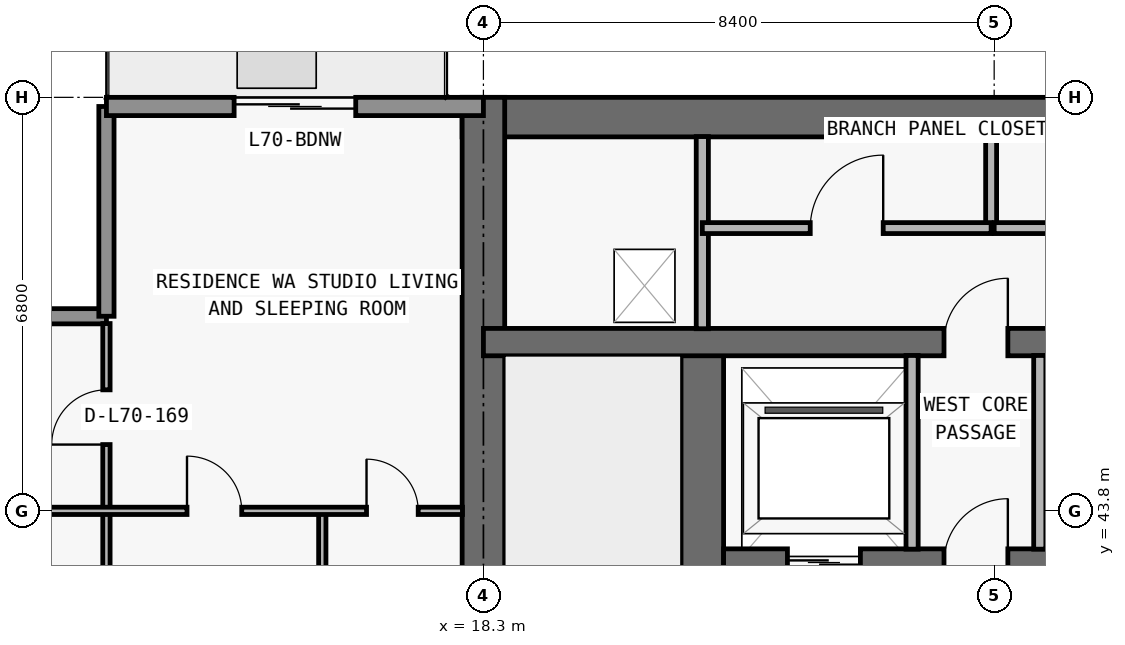
"""IFC4 building model, lengths in metres.
Left out: names, types, materials, properties, quantities, classifications, styles, units other than length and angle.
Written with IfcOpenShell. Run it as: python <this file> out.ifc"""

import sys

from ifc_helpers import new_model, si_unit, direction, frame, frame_2d, origin, place, context, subcontext, project, spatial, rectangle, extrude, element, fill, save


model = new_model("IFC4")
c1 = context("Model", 3, precision=1e-05, world=origin(), true_north=direction((0.0, 1.0)))
c2 = subcontext(c1, "Body", "Model", "MODEL_VIEW")
j1 = project(units=[si_unit("LENGTHUNIT", "METRE"), si_unit("PLANEANGLEUNIT", "RADIAN")], contexts=[c1])
p1 = place(None, origin())
s1 = spatial("IfcSite", under=j1, at=p1, CompositionType="ELEMENT")
p2 = place(p1, origin())
s2 = spatial("IfcBuilding", under=s1, at=p2, CompositionType="ELEMENT")
p3 = place(p2, frame((0.0, 0.0, 249.6)))
s3 = spatial("IfcBuildingStorey", under=s2, at=p3, CompositionType="ELEMENT", Elevation=249.6)
p4 = place(p3, frame((17.95, 50.275, 0.0), z_axis=(0.0, 0.0, 1.0), x_axis=(1.0, 0.0, 0.0)))
e1 = element("IfcWall", 1, at=p4, inside=s3, PredefinedType="SHEAR", context=c2, shape_type="SweptSolid", body=[
    extrude(rectangle(XDim=41.9, YDim=0.65, at=frame_2d((20.95, 0.0))), origin(), (0.0, 0.0, 1.0), 3.05),
])
p5 = place(p3, frame((18.3, 36.65, 0.0), z_axis=(0.0, 0.0, 1.0), x_axis=(0.0, 1.0, 0.0)))
e2 = element("IfcWall", 2, at=p5, inside=s3, PredefinedType="SHEAR", context=c2, shape_type="SweptSolid", body=[
    extrude(rectangle(XDim=13.95, YDim=0.7, at=frame_2d((6.975, 0.0))), origin(), (0.0, 0.0, 1.0), 3.05),
])
p6 = place(p3, frame((21.9, 37.0, 0.0), z_axis=(0.0, 0.0, 1.0), x_axis=(0.0, 1.0, 0.0)))
e3 = element("IfcWall", 3, at=p6, inside=s3, PredefinedType="SHEAR", context=c2, shape_type="SweptSolid", body=[
    extrude(rectangle(XDim=9.575, YDim=0.7, at=frame_2d((4.788, 0.0))), origin(), (0.0, 0.0, 1.0), 3.05),
])
p7 = place(p6, frame((0.55, 0.0, 0.0)))
e4 = element("IfcOpeningElement", 4, at=p7, cuts=e3, PredefinedType="OPENING", context=c2, shape_type="SweptSolid", body=[
    extrude(rectangle(XDim=1.1, YDim=2.15, at=frame_2d((0.55, 1.075))), frame((0.0, 0.36, 0.0), z_axis=(0.0, -1.0, 0.0), x_axis=(1.0, 0.0, 0.0)), (0.0, 0.0, 1.0), 0.72),
])
p8 = place(p3, frame((22.25, 42.95, 0.0), z_axis=(0.0, 0.0, 1.0), x_axis=(1.0, 0.0, 0.0)))
e5 = element("IfcWall", 5, at=p8, inside=s3, PredefinedType="SHEAR", context=c2, shape_type="SweptSolid", body=[
    extrude(rectangle(XDim=33.3, YDim=0.45, at=frame_2d((16.65, 0.0))), origin(), (0.0, 0.0, 1.0), 3.05),
])
p9 = place(p8, frame((1.05, 0.0, 0.0)))
e6 = element("IfcOpeningElement", 6, at=p9, cuts=e5, PredefinedType="OPENING", context=c2, shape_type="SweptSolid", body=[
    extrude(rectangle(XDim=1.2, YDim=2.2, at=frame_2d((0.6, 1.1))), frame((0.0, 0.235, 0.0), z_axis=(0.0, -1.0, 0.0), x_axis=(1.0, 0.0, 0.0)), (0.0, 0.0, 1.0), 0.47),
])
p10 = place(p8, frame((31.05, 0.0, 0.0)))
e7 = element("IfcOpeningElement", 7, at=p10, cuts=e5, PredefinedType="OPENING", context=c2, shape_type="SweptSolid", body=[
    extrude(rectangle(XDim=1.2, YDim=2.2, at=frame_2d((0.6, 1.1))), frame((0.0, 0.235, 0.0), z_axis=(0.0, -1.0, 0.0), x_axis=(1.0, 0.0, 0.0)), (0.0, 0.0, 1.0), 0.47),
])
p11 = place(p8, frame((26.45, 0.0, 0.0)))
e8 = element("IfcOpeningElement", 8, at=p11, cuts=e5, PredefinedType="OPENING", context=c2, shape_type="SweptSolid", body=[
    extrude(rectangle(XDim=1.1, YDim=2.2, at=frame_2d((0.55, 1.1))), frame((0.0, 0.235, 0.0), z_axis=(0.0, -1.0, 0.0), x_axis=(1.0, 0.0, 0.0)), (0.0, 0.0, 1.0), 0.47),
])
p12 = place(p8, frame((5.95, 0.0, 0.0)))
e9 = element("IfcOpeningElement", 9, at=p12, cuts=e5, PredefinedType="OPENING", context=c2, shape_type="SweptSolid", body=[
    extrude(rectangle(XDim=1.1, YDim=2.2, at=frame_2d((0.55, 1.1))), frame((0.0, 0.235, 0.0), z_axis=(0.0, -1.0, 0.0), x_axis=(1.0, 0.0, 0.0)), (0.0, 0.0, 1.0), 0.47),
])
p13 = place(p8, frame((3.625, 0.0, 0.0)))
e10 = element("IfcOpeningElement", 10, at=p13, cuts=e5, PredefinedType="OPENING", context=c2, shape_type="SweptSolid", body=[
    extrude(rectangle(XDim=1.05, YDim=2.15, at=frame_2d((0.525, 1.075))), frame((0.0, 0.235, 0.0), z_axis=(0.0, -1.0, 0.0), x_axis=(1.0, 0.0, 0.0)), (0.0, 0.0, 1.0), 0.47),
])
p14 = place(p8, frame((28.675, 0.0, 0.0)))
e11 = element("IfcOpeningElement", 11, at=p14, cuts=e5, PredefinedType="OPENING", context=c2, shape_type="SweptSolid", body=[
    extrude(rectangle(XDim=1.05, YDim=2.15, at=frame_2d((0.525, 1.075))), frame((0.0, 0.235, 0.0), z_axis=(0.0, -1.0, 0.0), x_axis=(1.0, 0.0, 0.0)), (0.0, 0.0, 1.0), 0.47),
])
p15 = place(p8, frame((15.225, 0.0, 0.0)))
e12 = element("IfcOpeningElement", 12, at=p15, cuts=e5, PredefinedType="OPENING", context=c2, shape_type="SweptSolid", body=[
    extrude(rectangle(XDim=1.0, YDim=2.2, at=frame_2d((0.5, 1.1))), frame((0.0, 0.235, 0.0), z_axis=(0.0, -1.0, 0.0), x_axis=(1.0, 0.0, 0.0)), (0.0, 0.0, 1.0), 0.47),
])
p16 = place(p8, frame((21.975, 0.0, 0.0)))
e13 = element("IfcOpeningElement", 13, at=p16, cuts=e5, PredefinedType="OPENING", context=c2, shape_type="SweptSolid", body=[
    extrude(rectangle(XDim=1.0, YDim=2.2, at=frame_2d((0.5, 1.1))), frame((0.0, 0.235, 0.0), z_axis=(0.0, -1.0, 0.0), x_axis=(1.0, 0.0, 0.0)), (0.0, 0.0, 1.0), 0.47),
])
p17 = place(p3, frame((18.3, 46.575, 0.0), z_axis=(0.0, 0.0, 1.0), x_axis=(1.0, 0.0, 0.0)))
e14 = element("IfcWall", 14, at=p17, inside=s3, PredefinedType="SHEAR", context=c2, shape_type="SweptSolid", body=[
    extrude(rectangle(XDim=41.2, YDim=0.45, at=frame_2d((20.6, 0.0))), origin(), (0.0, 0.0, 1.0), 3.05),
])
p18 = place(p17, frame((7.575, 0.0, 0.0)))
e15 = element("IfcOpeningElement", 15, at=p18, cuts=e14, PredefinedType="OPENING", context=c2, shape_type="SweptSolid", body=[
    extrude(rectangle(XDim=1.05, YDim=2.15, at=frame_2d((0.525, 1.075))), frame((0.0, 0.235, 0.0), z_axis=(0.0, -1.0, 0.0), x_axis=(1.0, 0.0, 0.0)), (0.0, 0.0, 1.0), 0.47),
])
p19 = place(p17, frame((32.625, 0.0, 0.0)))
e16 = element("IfcOpeningElement", 16, at=p19, cuts=e14, PredefinedType="OPENING", context=c2, shape_type="SweptSolid", body=[
    extrude(rectangle(XDim=1.05, YDim=2.15, at=frame_2d((0.525, 1.075))), frame((0.0, 0.235, 0.0), z_axis=(0.0, -1.0, 0.0), x_axis=(1.0, 0.0, 0.0)), (0.0, 0.0, 1.0), 0.47),
])
p20 = place(p3, frame((8.25, 47.0, 0.0), z_axis=(0.0, 0.0, 1.0), x_axis=(1.0, 0.0, 0.0)))
e17 = element("IfcWall", 17, at=p20, inside=s3, PredefinedType="ELEMENTEDWALL", context=c2, shape_type="SweptSolid", body=[
    extrude(rectangle(XDim=3.85, YDim=0.25, at=frame_2d((1.925, 0.0))), origin(), (0.0, 0.0, 1.0), 3.05),
])
p21 = place(p3, frame((12.1, 47.0, 0.0), z_axis=(0.0, 0.0, 1.0), x_axis=(0.0, 1.0, 0.0)))
e18 = element("IfcWall", 18, at=p21, inside=s3, PredefinedType="ELEMENTEDWALL", context=c2, shape_type="SweptSolid", body=[
    extrude(rectangle(XDim=3.45, YDim=0.25, at=frame_2d((1.725, 0.0))), origin(), (0.0, 0.0, 1.0), 3.05),
])
p22 = place(p3, frame((12.1, 50.45, 0.0), z_axis=(0.0, 0.0, 1.0), x_axis=(1.0, 0.0, 0.0)))
e19 = element("IfcWall", 19, at=p22, inside=s3, PredefinedType="STANDARD", context=c2, shape_type="SweptSolid", body=[
    extrude(rectangle(XDim=6.2, YDim=0.3, at=frame_2d((3.1, 0.0))), origin(), (0.0, 0.0, 1.0), 3.05),
])
p23 = place(p22, frame((2.1, 0.0, 0.0)))
e20 = element("IfcOpeningElement", 20, at=p23, cuts=e19, PredefinedType="OPENING", context=c2, shape_type="SweptSolid", body=[
    extrude(rectangle(XDim=2.0, YDim=2.3, at=frame_2d((1.0, 1.15))), frame((0.0, 0.16, 0.0), z_axis=(0.0, -1.0, 0.0), x_axis=(1.0, 0.0, 0.0)), (0.0, 0.0, 1.0), 0.32),
])
p24 = place(p3, frame((12.1, 37.005, 0.0), z_axis=(0.0, 0.0, 1.0), x_axis=(0.0, 1.0, 0.0)))
e21 = element("IfcWall", 21, at=p24, inside=s3, PredefinedType="PARTITIONING", context=c2, shape_type="SweptSolid", body=[
    extrude(rectangle(XDim=9.875, YDim=0.12, at=frame_2d((4.938, 0.0))), origin(), (0.0, 0.0, 1.0), 2.578),
])
p25 = place(p24, frame((2.948, 0.0, 0.0)))
e22 = element("IfcOpeningElement", 22, at=p25, cuts=e21, PredefinedType="OPENING", context=c2, shape_type="SweptSolid", body=[
    extrude(rectangle(XDim=0.9, YDim=2.15, at=frame_2d((0.45, 1.075))), frame((0.0, 0.07, 0.0), z_axis=(0.0, -1.0, 0.0), x_axis=(1.0, 0.0, 0.0)), (0.0, 0.0, 1.0), 0.14),
])
p26 = place(p24, frame((7.885, 0.0, 0.0)))
e23 = element("IfcOpeningElement", 23, at=p26, cuts=e21, PredefinedType="OPENING", context=c2, shape_type="SweptSolid", body=[
    extrude(rectangle(XDim=0.9, YDim=2.15, at=frame_2d((0.45, 1.075))), frame((0.0, 0.07, 0.0), z_axis=(0.0, -1.0, 0.0), x_axis=(1.0, 0.0, 0.0)), (0.0, 0.0, 1.0), 0.14),
])
p27 = place(p3, frame((15.65, 37.0, 0.0), z_axis=(0.0, 0.0, 1.0), x_axis=(0.0, 1.0, 0.0)))
e24 = element("IfcWall", 24, at=p27, inside=s3, PredefinedType="PARTITIONING", context=c2, shape_type="SweptSolid", body=[
    extrude(rectangle(XDim=6.8, YDim=0.12, at=frame_2d((3.4, 0.0))), origin(), (0.0, 0.0, 1.0), 3.05),
])
p28 = place(p27, frame((1.207, 0.0, 0.0)))
e25 = element("IfcOpeningElement", 25, at=p28, cuts=e24, PredefinedType="OPENING", context=c2, shape_type="SweptSolid", body=[
    extrude(rectangle(XDim=0.85, YDim=2.1, at=frame_2d((0.425, 1.05))), frame((0.0, 0.07, 0.0), z_axis=(0.0, -1.0, 0.0), x_axis=(1.0, 0.0, 0.0)), (0.0, 0.0, 1.0), 0.14),
])
p29 = place(p3, frame((21.9, 46.795, 0.0), z_axis=(0.0, 0.0, 1.0), x_axis=(0.0, 1.0, 0.0)))
e26 = element("IfcWall", 26, at=p29, inside=s3, PredefinedType="PARTITIONING", context=c2, shape_type="SweptSolid", body=[
    extrude(rectangle(XDim=3.16, YDim=0.2, at=frame_2d((1.58, 0.0))), origin(), (0.0, 0.0, 1.0), 3.05),
])
p30 = place(p3, frame((25.35, 43.17, 0.0), z_axis=(0.0, 0.0, 1.0), x_axis=(0.0, 1.0, 0.0)))
e27 = element("IfcWall", 27, at=p30, inside=s3, PredefinedType="PARTITIONING", context=c2, shape_type="SweptSolid", body=[
    extrude(rectangle(XDim=3.185, YDim=0.2, at=frame_2d((1.593, 0.0))), origin(), (0.0, 0.0, 1.0), 3.05),
])
p31 = place(p3, frame((26.65, 48.45, 0.0), z_axis=(0.0, 0.0, 1.0), x_axis=(0.0, 1.0, 0.0)))
e28 = element("IfcWall", 28, at=p31, inside=s3, PredefinedType="PARTITIONING", context=c2, shape_type="SweptSolid", body=[
    extrude(rectangle(XDim=1.505, YDim=0.18, at=frame_2d((0.752, 0.0))), origin(), (0.0, 0.0, 1.0), 3.05),
])
p32 = place(p3, frame((27.45, 43.17, 0.0), z_axis=(0.0, 0.0, 1.0), x_axis=(0.0, 1.0, 0.0)))
e29 = element("IfcWall", 29, at=p32, inside=s3, PredefinedType="PARTITIONING", context=c2, shape_type="SweptSolid", body=[
    extrude(rectangle(XDim=3.185, YDim=0.2, at=frame_2d((1.593, 0.0))), origin(), (0.0, 0.0, 1.0), 3.05),
])
p33 = place(p3, frame((8.395, 43.8, 0.0), z_axis=(0.0, 0.0, 1.0), x_axis=(1.0, 0.0, 0.0)))
e30 = element("IfcWall", 30, at=p33, inside=s3, PredefinedType="PARTITIONING", context=c2, shape_type="SweptSolid", body=[
    extrude(rectangle(XDim=9.56, YDim=0.12, at=frame_2d((4.78, 0.0))), origin(), (0.0, 0.0, 1.0), 2.418),
])
p34 = place(p33, frame((5.03, 0.0, 0.0)))
e31 = element("IfcOpeningElement", 31, at=p34, cuts=e30, PredefinedType="OPENING", context=c2, shape_type="SweptSolid", body=[
    extrude(rectangle(XDim=0.9, YDim=2.15, at=frame_2d((0.45, 1.075))), frame((0.0, 0.07, 0.0), z_axis=(0.0, -1.0, 0.0), x_axis=(1.0, 0.0, 0.0)), (0.0, 0.0, 1.0), 0.14),
])
p35 = place(p33, frame((7.982, 0.0, 0.0)))
e32 = element("IfcOpeningElement", 32, at=p35, cuts=e30, PredefinedType="OPENING", context=c2, shape_type="SweptSolid", body=[
    extrude(rectangle(XDim=0.85, YDim=2.1, at=frame_2d((0.425, 1.05))), frame((0.0, 0.07, 0.0), z_axis=(0.0, -1.0, 0.0), x_axis=(1.0, 0.0, 0.0)), (0.0, 0.0, 1.0), 0.14),
])
p36 = place(p3, frame((21.9, 48.45, 0.0), z_axis=(0.0, 0.0, 1.0), x_axis=(1.0, 0.0, 0.0)))
e33 = element("IfcWall", 33, at=p36, inside=s3, PredefinedType="PARTITIONING", context=c2, shape_type="SweptSolid", body=[
    extrude(rectangle(XDim=4.75, YDim=0.18, at=frame_2d((2.375, 0.0))), origin(), (0.0, 0.0, 1.0), 3.05),
])
p37 = place(p36, frame((1.775, 0.0, 0.0)))
e34 = element("IfcOpeningElement", 34, at=p37, cuts=e33, PredefinedType="OPENING", context=c2, shape_type="SweptSolid", body=[
    extrude(rectangle(XDim=1.2, YDim=2.2, at=frame_2d((0.6, 1.1))), frame((0.0, 0.1, 0.0), z_axis=(0.0, -1.0, 0.0), x_axis=(1.0, 0.0, 0.0)), (0.0, 0.0, 1.0), 0.2),
])
p38 = place(p3, frame((26.7, 48.45, 0.0), z_axis=(0.0, 0.0, 1.0), x_axis=(1.0, 0.0, 0.0)))
e35 = element("IfcWall", 35, at=p38, inside=s3, PredefinedType="PARTITIONING", context=c2, shape_type="SweptSolid", body=[
    extrude(rectangle(XDim=29.2, YDim=0.18, at=frame_2d((14.6, 0.0))), origin(), (0.0, 0.0, 1.0), 3.05),
])
p39 = place(p38, frame((1.75, 0.0, 0.0)))
e36 = element("IfcOpeningElement", 36, at=p39, cuts=e35, PredefinedType="OPENING", context=c2, shape_type="SweptSolid", body=[
    extrude(rectangle(XDim=1.2, YDim=2.2, at=frame_2d((0.6, 1.1))), frame((0.0, 0.1, 0.0), z_axis=(0.0, -1.0, 0.0), x_axis=(1.0, 0.0, 0.0)), (0.0, 0.0, 1.0), 0.2),
])
p40 = place(p38, frame((6.475, 0.0, 0.0)))
e37 = element("IfcOpeningElement", 37, at=p40, cuts=e35, PredefinedType="OPENING", context=c2, shape_type="SweptSolid", body=[
    extrude(rectangle(XDim=1.2, YDim=2.2, at=frame_2d((0.6, 1.1))), frame((0.0, 0.1, 0.0), z_axis=(0.0, -1.0, 0.0), x_axis=(1.0, 0.0, 0.0)), (0.0, 0.0, 1.0), 0.2),
])
p41 = place(p38, frame((14.05, 0.0, 0.0)))
e38 = element("IfcOpeningElement", 38, at=p41, cuts=e35, PredefinedType="OPENING", context=c2, shape_type="SweptSolid", body=[
    extrude(rectangle(XDim=1.0, YDim=2.2, at=frame_2d((0.5, 1.1))), frame((0.0, 0.1, 0.0), z_axis=(0.0, -1.0, 0.0), x_axis=(1.0, 0.0, 0.0)), (0.0, 0.0, 1.0), 0.2),
])
p42 = place(p38, frame((21.425, 0.0, 0.0)))
e39 = element("IfcOpeningElement", 39, at=p42, cuts=e35, PredefinedType="OPENING", context=c2, shape_type="SweptSolid", body=[
    extrude(rectangle(XDim=1.2, YDim=2.2, at=frame_2d((0.6, 1.1))), frame((0.0, 0.1, 0.0), z_axis=(0.0, -1.0, 0.0), x_axis=(1.0, 0.0, 0.0)), (0.0, 0.0, 1.0), 0.2),
])
p43 = place(p38, frame((26.375, 0.0, 0.0)))
e40 = element("IfcOpeningElement", 40, at=p43, cuts=e35, PredefinedType="OPENING", context=c2, shape_type="SweptSolid", body=[
    extrude(rectangle(XDim=0.85, YDim=2.1, at=frame_2d((0.425, 1.05))), frame((0.0, 0.1, 0.0), z_axis=(0.0, -1.0, 0.0), x_axis=(1.0, 0.0, 0.0)), (0.0, 0.0, 1.0), 0.2),
])
p44 = place(p23, origin())
e41 = element("IfcDoor", 41, at=p44, inside=s3, OperationType="DOUBLE_DOOR_SLIDING", PredefinedType="DOOR", context=c2, shape_type="SweptSolid", body=[
    extrude(rectangle(XDim=2.0, YDim=2.3, at=frame_2d((1.0, 1.15))), frame((0.0, 0.025, 0.0), z_axis=(0.0, -1.0, 0.0), x_axis=(1.0, 0.0, 0.0)), (0.0, 0.0, 1.0), 0.05),
])
fill(e20, e41)
p45 = place(p9, origin())
e42 = element("IfcDoor", 42, at=p45, inside=s3, OperationType="DOUBLE_DOOR_SLIDING", PredefinedType="DOOR", context=c2, shape_type="SweptSolid", body=[
    extrude(rectangle(XDim=1.2, YDim=2.2, at=frame_2d((0.6, 1.1))), frame((0.0, 0.025, 0.0), z_axis=(0.0, -1.0, 0.0), x_axis=(1.0, 0.0, 0.0)), (0.0, 0.0, 1.0), 0.05),
])
fill(e6, e42)
p46 = place(p13, origin())
e43 = element("IfcDoor", 43, at=p46, inside=s3, OperationType="SINGLE_SWING_RIGHT", PredefinedType="DOOR", context=c2, shape_type="SweptSolid", body=[
    extrude(rectangle(XDim=1.05, YDim=2.15, at=frame_2d((0.525, 1.075))), frame((0.0, 0.025, 0.0), z_axis=(0.0, -1.0, 0.0), x_axis=(1.0, 0.0, 0.0)), (0.0, 0.0, 1.0), 0.05),
])
fill(e10, e43)
p47 = place(p18, origin())
e44 = element("IfcDoor", 44, at=p47, inside=s3, OperationType="SINGLE_SWING_RIGHT", PredefinedType="DOOR", context=c2, shape_type="SweptSolid", body=[
    extrude(rectangle(XDim=1.05, YDim=2.15, at=frame_2d((0.525, 1.075))), frame((0.0, 0.025, 0.0), z_axis=(0.0, -1.0, 0.0), x_axis=(1.0, 0.0, 0.0)), (0.0, 0.0, 1.0), 0.05),
])
fill(e15, e44)
p48 = place(p37, origin())
e45 = element("IfcDoor", 45, at=p48, inside=s3, OperationType="SINGLE_SWING_RIGHT", PredefinedType="DOOR", context=c2, shape_type="SweptSolid", body=[
    extrude(rectangle(XDim=1.2, YDim=2.2, at=frame_2d((0.6, 1.1))), frame((0.0, 0.025, 0.0), z_axis=(0.0, -1.0, 0.0), x_axis=(1.0, 0.0, 0.0)), (0.0, 0.0, 1.0), 0.05),
])
fill(e34, e45)
p49 = place(p34, origin())
e46 = element("IfcDoor", 46, at=p49, inside=s3, OperationType="SINGLE_SWING_LEFT", PredefinedType="DOOR", context=c2, shape_type="SweptSolid", body=[
    extrude(rectangle(XDim=0.9, YDim=2.15, at=frame_2d((0.45, 1.075))), frame((0.0, 0.025, 0.0), z_axis=(0.0, -1.0, 0.0), x_axis=(1.0, 0.0, 0.0)), (0.0, 0.0, 1.0), 0.05),
])
fill(e31, e46)
p50 = place(p35, origin())
e47 = element("IfcDoor", 47, at=p50, inside=s3, OperationType="SINGLE_SWING_LEFT", PredefinedType="DOOR", context=c2, shape_type="SweptSolid", body=[
    extrude(rectangle(XDim=0.85, YDim=2.1, at=frame_2d((0.425, 1.05))), frame((0.0, 0.025, 0.0), z_axis=(0.0, -1.0, 0.0), x_axis=(1.0, 0.0, 0.0)), (0.0, 0.0, 1.0), 0.05),
])
fill(e32, e47)
p51 = place(p26, origin())
e48 = element("IfcDoor", 48, at=p51, inside=s3, OperationType="SINGLE_SWING_LEFT", PredefinedType="DOOR", context=c2, shape_type="SweptSolid", body=[
    extrude(rectangle(XDim=0.9, YDim=2.15, at=frame_2d((0.45, 1.075))), frame((0.0, 0.025, 0.0), z_axis=(0.0, -1.0, 0.0), x_axis=(1.0, 0.0, 0.0)), (0.0, 0.0, 1.0), 0.05),
])
fill(e23, e48)
save(model, sys.argv[1])
